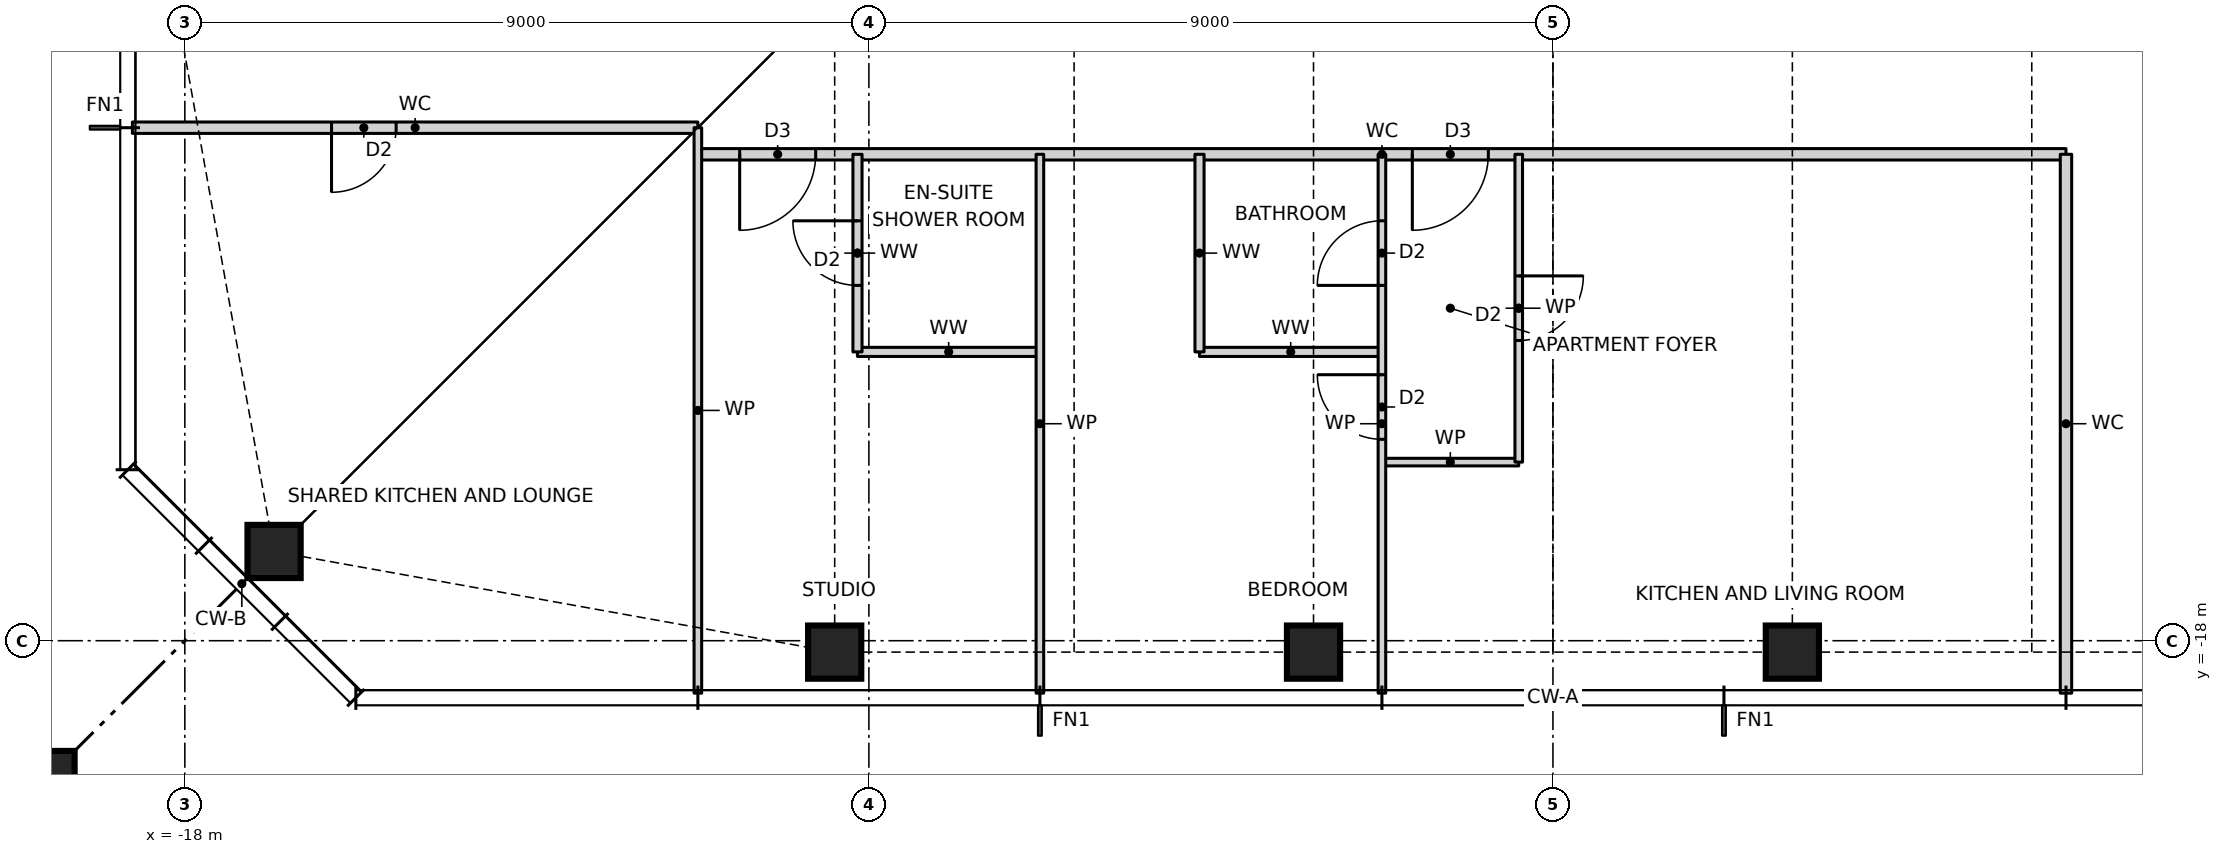
"""IFC4 building model, lengths in metres.
Left out: names, types, materials, properties, quantities, classifications, styles, units other than length and angle.
Written with IfcOpenShell. Run it as: python <this file> out.ifc"""

import sys

from ifc_helpers import new_model, si_unit, direction, frame, frame_2d, origin, origin_2d, place, context, subcontext, project, spatial, rectangle, hollow_rectangle, i_section, extrude, element, fill, save


model = new_model("IFC4")
c1 = context("Model", 3, precision=1e-05, world=origin(), true_north=direction((0.0, 1.0)))
c2 = subcontext(c1, "Body", "Model", "MODEL_VIEW")
j1 = project(units=[si_unit("LENGTHUNIT", "METRE"), si_unit("PLANEANGLEUNIT", "RADIAN")], contexts=[c1])
p1 = place(None, origin())
s1 = spatial("IfcSite", under=j1, at=p1, CompositionType="ELEMENT")
p2 = place(p1, origin())
s2 = spatial("IfcBuilding", under=s1, at=p2, CompositionType="ELEMENT")
p3 = place(p2, frame((0.0, 0.0, 188.0)))
s3 = spatial("IfcBuildingStorey", under=s2, at=p3, CompositionType="ELEMENT", Elevation=188.0)
for number, where, z_axis, x_axis in (
    (1, (-16.826, -16.826, 0.0), (0.0, 0.0, 1.0), (1.0, 0.0, 0.0)),
    (2, (-9.45, -18.15, 0.0), (0.0, 0.0, 1.0), (1.0, 0.0, 0.0)),
    (3, (-3.15, -18.15, 0.0), (0.0, 0.0, 1.0), (1.0, 0.0, 0.0)),
    (4, (3.15, -18.15, 0.0), (0.0, 0.0, 1.0), (1.0, 0.0, 0.0)),
):
    element("IfcColumn", number, at=place(p3, frame(where, z_axis=z_axis, x_axis=x_axis)), inside=s3, PredefinedType="COLUMN", context=c2, shape_type="SweptSolid", body=[
        extrude(hollow_rectangle(XDim=0.7, YDim=0.7, WallThickness=0.06, at=origin_2d()), origin(), (0.0, 0.0, 1.0), 3.5),
    ])
p4 = place(p3, frame((-21.65, -21.65, 0.0), z_axis=(0.0, 0.0, 1.0), x_axis=(1.0, 0.0, 0.0)))
e5 = element("IfcColumn", 5, at=p4, inside=s3, PredefinedType="COLUMN", context=c2, shape_type="SweptSolid", body=[
    extrude(rectangle(XDim=4.4, YDim=4.4, at=origin_2d()), origin(), (0.0, 0.0, 1.0), 3.5),
    extrude(i_section(OverallWidth=0.478, OverallDepth=0.599, WebThickness=0.1, FlangeThickness=0.14, at=origin_2d()), origin(), (0.0, 0.0, 1.0), 3.5),
])
p5 = place(p3, frame((-2.25, -15.65, 0.0), z_axis=(0.0, 0.0, 1.0), x_axis=(1.0, 0.0, 0.0)))
e6 = element("IfcWall", 6, at=p5, inside=s3, PredefinedType="PARTITIONING", context=c2, shape_type="SweptSolid", body=[
    extrude(rectangle(XDim=1.8, YDim=0.1, at=frame_2d((0.9, 0.0))), origin(), (0.0, 0.0, 1.0), 3.27),
])
for number, where, z_axis, x_axis in (
    (7, (-9.15, -14.2, 0.0), (0.0, 0.0, 1.0), (1.0, 0.0, 0.0)),
    (8, (-4.65, -14.2, 0.0), (0.0, 0.0, 1.0), (1.0, 0.0, 0.0)),
):
    element("IfcWall", number, at=place(p3, frame(where, z_axis=z_axis, x_axis=x_axis)), inside=s3, PredefinedType="PARTITIONING", context=c2, shape_type="SweptSolid", body=[
        extrude(rectangle(XDim=2.4, YDim=0.12, at=frame_2d((1.2, 0.0))), origin(), (0.0, 0.0, 1.0), 3.27),
    ])
p6 = place(p3, frame((-11.25, -11.6, 0.0), z_axis=(0.0, 0.0, 1.0), x_axis=(1.0, 0.0, 0.0)))
e9 = element("IfcWall", 9, at=p6, inside=s3, PredefinedType="PARTITIONING", context=c2, shape_type="SweptSolid", body=[
    extrude(rectangle(XDim=18.0, YDim=0.15, at=frame_2d((9.0, 0.0))), origin(), (0.0, 0.0, 1.0), 3.27),
])
p7 = place(p6, frame((0.55, 0.0, 0.0)))
e10 = element("IfcOpeningElement", 10, at=p7, cuts=e9, PredefinedType="OPENING", context=c2, shape_type="SweptSolid", body=[
    extrude(rectangle(XDim=1.0, YDim=2.1, at=frame_2d((0.5, 1.05))), frame((0.0, 0.085, 0.0), z_axis=(0.0, -1.0, 0.0), x_axis=(1.0, 0.0, 0.0)), (0.0, 0.0, 1.0), 0.17),
])
p8 = place(p6, frame((9.4, 0.0, 0.0)))
e11 = element("IfcOpeningElement", 11, at=p8, cuts=e9, PredefinedType="OPENING", context=c2, shape_type="SweptSolid", body=[
    extrude(rectangle(XDim=1.0, YDim=2.1, at=frame_2d((0.5, 1.05))), frame((0.0, 0.085, 0.0), z_axis=(0.0, -1.0, 0.0), x_axis=(1.0, 0.0, 0.0)), (0.0, 0.0, 1.0), 0.17),
])
p9 = place(p3, frame((-18.69, -11.25, 0.0), z_axis=(0.0, 0.0, 1.0), x_axis=(1.0, 0.0, 0.0)))
e12 = element("IfcWall", 12, at=p9, inside=s3, PredefinedType="PARTITIONING", context=c2, shape_type="SweptSolid", body=[
    extrude(rectangle(XDim=7.44, YDim=0.15, at=frame_2d((3.72, 0.0))), origin(), (0.0, 0.0, 1.0), 3.27),
])
p10 = place(p9, frame((2.62, 0.0, 0.0)))
e13 = element("IfcOpeningElement", 13, at=p10, cuts=e12, PredefinedType="OPENING", context=c2, shape_type="SweptSolid", body=[
    extrude(rectangle(XDim=0.85, YDim=2.1, at=frame_2d((0.425, 1.05))), frame((0.0, 0.085, 0.0), z_axis=(0.0, -1.0, 0.0), x_axis=(1.0, 0.0, 0.0)), (0.0, 0.0, 1.0), 0.17),
])
p11 = place(p3, frame((6.75, -18.69, 0.0), z_axis=(0.0, 0.0, 1.0), x_axis=(0.0, 1.0, 0.0)))
e14 = element("IfcWall", 14, at=p11, inside=s3, PredefinedType="PARTITIONING", context=c2, shape_type="SweptSolid", body=[
    extrude(rectangle(XDim=7.09, YDim=0.15, at=frame_2d((3.545, 0.0))), origin(), (0.0, 0.0, 1.0), 3.27),
])
p12 = place(p3, frame((-0.45, -15.65, 0.0), z_axis=(0.0, 0.0, 1.0), x_axis=(0.0, 1.0, 0.0)))
e15 = element("IfcWall", 15, at=p12, inside=s3, PredefinedType="PARTITIONING", context=c2, shape_type="SweptSolid", body=[
    extrude(rectangle(XDim=4.05, YDim=0.1, at=frame_2d((2.025, 0.0))), origin(), (0.0, 0.0, 1.0), 3.27),
])
p13 = place(p12, frame((1.6, 0.0, 0.0)))
e16 = element("IfcOpeningElement", 16, at=p13, cuts=e15, PredefinedType="OPENING", context=c2, shape_type="SweptSolid", body=[
    extrude(rectangle(XDim=0.85, YDim=2.1, at=frame_2d((0.425, 1.05))), frame((0.0, 0.06, 0.0), z_axis=(0.0, -1.0, 0.0), x_axis=(1.0, 0.0, 0.0)), (0.0, 0.0, 1.0), 0.12),
])
p14 = place(p3, frame((-2.25, -18.69, 0.0), z_axis=(0.0, 0.0, 1.0), x_axis=(0.0, 1.0, 0.0)))
e17 = element("IfcWall", 17, at=p14, inside=s3, PredefinedType="PARTITIONING", context=c2, shape_type="SweptSolid", body=[
    extrude(rectangle(XDim=7.09, YDim=0.1, at=frame_2d((3.545, 0.0))), origin(), (0.0, 0.0, 1.0), 3.27),
])
p15 = place(p14, frame((3.34, 0.0, 0.0)))
e18 = element("IfcOpeningElement", 18, at=p15, cuts=e17, PredefinedType="OPENING", context=c2, shape_type="SweptSolid", body=[
    extrude(rectangle(XDim=0.85, YDim=2.1, at=frame_2d((0.425, 1.05))), frame((0.0, 0.06, 0.0), z_axis=(0.0, -1.0, 0.0), x_axis=(1.0, 0.0, 0.0)), (0.0, 0.0, 1.0), 0.12),
])
p16 = place(p14, frame((5.365, 0.0, 0.0)))
e19 = element("IfcOpeningElement", 19, at=p16, cuts=e17, PredefinedType="OPENING", context=c2, shape_type="SweptSolid", body=[
    extrude(rectangle(XDim=0.85, YDim=2.1, at=frame_2d((0.425, 1.05))), frame((0.0, 0.06, 0.0), z_axis=(0.0, -1.0, 0.0), x_axis=(1.0, 0.0, 0.0)), (0.0, 0.0, 1.0), 0.12),
])
p17 = place(p3, frame((-4.65, -14.2, 0.0), z_axis=(0.0, 0.0, 1.0), x_axis=(0.0, 1.0, 0.0)))
e20 = element("IfcWall", 20, at=p17, inside=s3, PredefinedType="PARTITIONING", context=c2, shape_type="SweptSolid", body=[
    extrude(rectangle(XDim=2.6, YDim=0.12, at=frame_2d((1.3, 0.0))), origin(), (0.0, 0.0, 1.0), 3.27),
])
p18 = place(p3, frame((-6.75, -18.69, 0.0), z_axis=(0.0, 0.0, 1.0), x_axis=(0.0, 1.0, 0.0)))
e21 = element("IfcWall", 21, at=p18, inside=s3, PredefinedType="PARTITIONING", context=c2, shape_type="SweptSolid", body=[
    extrude(rectangle(XDim=7.09, YDim=0.1, at=frame_2d((3.545, 0.0))), origin(), (0.0, 0.0, 1.0), 3.27),
])
p19 = place(p3, frame((-9.15, -14.2, 0.0), z_axis=(0.0, 0.0, 1.0), x_axis=(0.0, 1.0, 0.0)))
e22 = element("IfcWall", 22, at=p19, inside=s3, PredefinedType="PARTITIONING", context=c2, shape_type="SweptSolid", body=[
    extrude(rectangle(XDim=2.6, YDim=0.12, at=frame_2d((1.3, 0.0))), origin(), (0.0, 0.0, 1.0), 3.27),
])
p20 = place(p19, frame((0.875, 0.0, 0.0)))
e23 = element("IfcOpeningElement", 23, at=p20, cuts=e22, PredefinedType="OPENING", context=c2, shape_type="SweptSolid", body=[
    extrude(rectangle(XDim=0.85, YDim=2.1, at=frame_2d((0.425, 1.05))), frame((0.0, 0.07, 0.0), z_axis=(0.0, -1.0, 0.0), x_axis=(1.0, 0.0, 0.0)), (0.0, 0.0, 1.0), 0.14),
])
p21 = place(p3, frame((-11.25, -18.69, 0.0), z_axis=(0.0, 0.0, 1.0), x_axis=(0.0, 1.0, 0.0)))
e24 = element("IfcWall", 24, at=p21, inside=s3, PredefinedType="PARTITIONING", context=c2, shape_type="SweptSolid", body=[
    extrude(rectangle(XDim=7.44, YDim=0.1, at=frame_2d((3.72, 0.0))), origin(), (0.0, 0.0, 1.0), 3.27),
])
p22 = place(p7, frame((1.0, 0.0, 0.0), z_axis=(0.0, 0.0, 1.0), x_axis=(-1.0, 0.0, 0.0)))
e25 = element("IfcDoor", 25, at=p22, inside=s3, OperationType="SINGLE_SWING_RIGHT", PredefinedType="DOOR", context=c2, shape_type="SweptSolid", body=[
    extrude(rectangle(XDim=1.0, YDim=2.1, at=frame_2d((0.5, 1.05))), frame((0.0, 0.025, 0.0), z_axis=(0.0, -1.0, 0.0), x_axis=(1.0, 0.0, 0.0)), (0.0, 0.0, 1.0), 0.05),
])
fill(e10, e25)
p23 = place(p20, origin())
e26 = element("IfcDoor", 26, at=p23, inside=s3, OperationType="SINGLE_SWING_RIGHT", PredefinedType="DOOR", context=c2, shape_type="SweptSolid", body=[
    extrude(rectangle(XDim=0.85, YDim=2.1, at=frame_2d((0.425, 1.05))), frame((0.0, 0.025, 0.0), z_axis=(0.0, -1.0, 0.0), x_axis=(1.0, 0.0, 0.0)), (0.0, 0.0, 1.0), 0.05),
])
fill(e23, e26)
p24 = place(p8, frame((1.0, 0.0, 0.0), z_axis=(0.0, 0.0, 1.0), x_axis=(-1.0, 0.0, 0.0)))
e27 = element("IfcDoor", 27, at=p24, inside=s3, OperationType="SINGLE_SWING_RIGHT", PredefinedType="DOOR", context=c2, shape_type="SweptSolid", body=[
    extrude(rectangle(XDim=1.0, YDim=2.1, at=frame_2d((0.5, 1.05))), frame((0.0, 0.025, 0.0), z_axis=(0.0, -1.0, 0.0), x_axis=(1.0, 0.0, 0.0)), (0.0, 0.0, 1.0), 0.05),
])
fill(e11, e27)
p25 = place(p13, frame((0.85, 0.0, 0.0), z_axis=(0.0, 0.0, 1.0), x_axis=(-1.0, 0.0, 0.0)))
e28 = element("IfcDoor", 28, at=p25, inside=s3, OperationType="SINGLE_SWING_LEFT", PredefinedType="DOOR", context=c2, shape_type="SweptSolid", body=[
    extrude(rectangle(XDim=0.85, YDim=2.1, at=frame_2d((0.425, 1.05))), frame((0.0, 0.025, 0.0), z_axis=(0.0, -1.0, 0.0), x_axis=(1.0, 0.0, 0.0)), (0.0, 0.0, 1.0), 0.05),
])
fill(e16, e28)
p26 = place(p15, origin())
e29 = element("IfcDoor", 29, at=p26, inside=s3, OperationType="SINGLE_SWING_RIGHT", PredefinedType="DOOR", context=c2, shape_type="SweptSolid", body=[
    extrude(rectangle(XDim=0.85, YDim=2.1, at=frame_2d((0.425, 1.05))), frame((0.0, 0.025, 0.0), z_axis=(0.0, -1.0, 0.0), x_axis=(1.0, 0.0, 0.0)), (0.0, 0.0, 1.0), 0.05),
])
fill(e18, e29)
p27 = place(p16, origin())
e30 = element("IfcDoor", 30, at=p27, inside=s3, OperationType="SINGLE_SWING_LEFT", PredefinedType="DOOR", context=c2, shape_type="SweptSolid", body=[
    extrude(rectangle(XDim=0.85, YDim=2.1, at=frame_2d((0.425, 1.05))), frame((0.0, 0.025, 0.0), z_axis=(0.0, -1.0, 0.0), x_axis=(1.0, 0.0, 0.0)), (0.0, 0.0, 1.0), 0.05),
])
fill(e19, e30)
p28 = place(p10, frame((0.85, 0.0, 0.0), z_axis=(0.0, 0.0, 1.0), x_axis=(-1.0, 0.0, 0.0)))
e31 = element("IfcDoor", 31, at=p28, inside=s3, OperationType="SINGLE_SWING_RIGHT", PredefinedType="DOOR", context=c2, shape_type="SweptSolid", body=[
    extrude(rectangle(XDim=0.85, YDim=2.1, at=frame_2d((0.425, 1.05))), frame((0.0, 0.025, 0.0), z_axis=(0.0, -1.0, 0.0), x_axis=(1.0, 0.0, 0.0)), (0.0, 0.0, 1.0), 0.05),
])
fill(e13, e31)
save(model, sys.argv[1])
